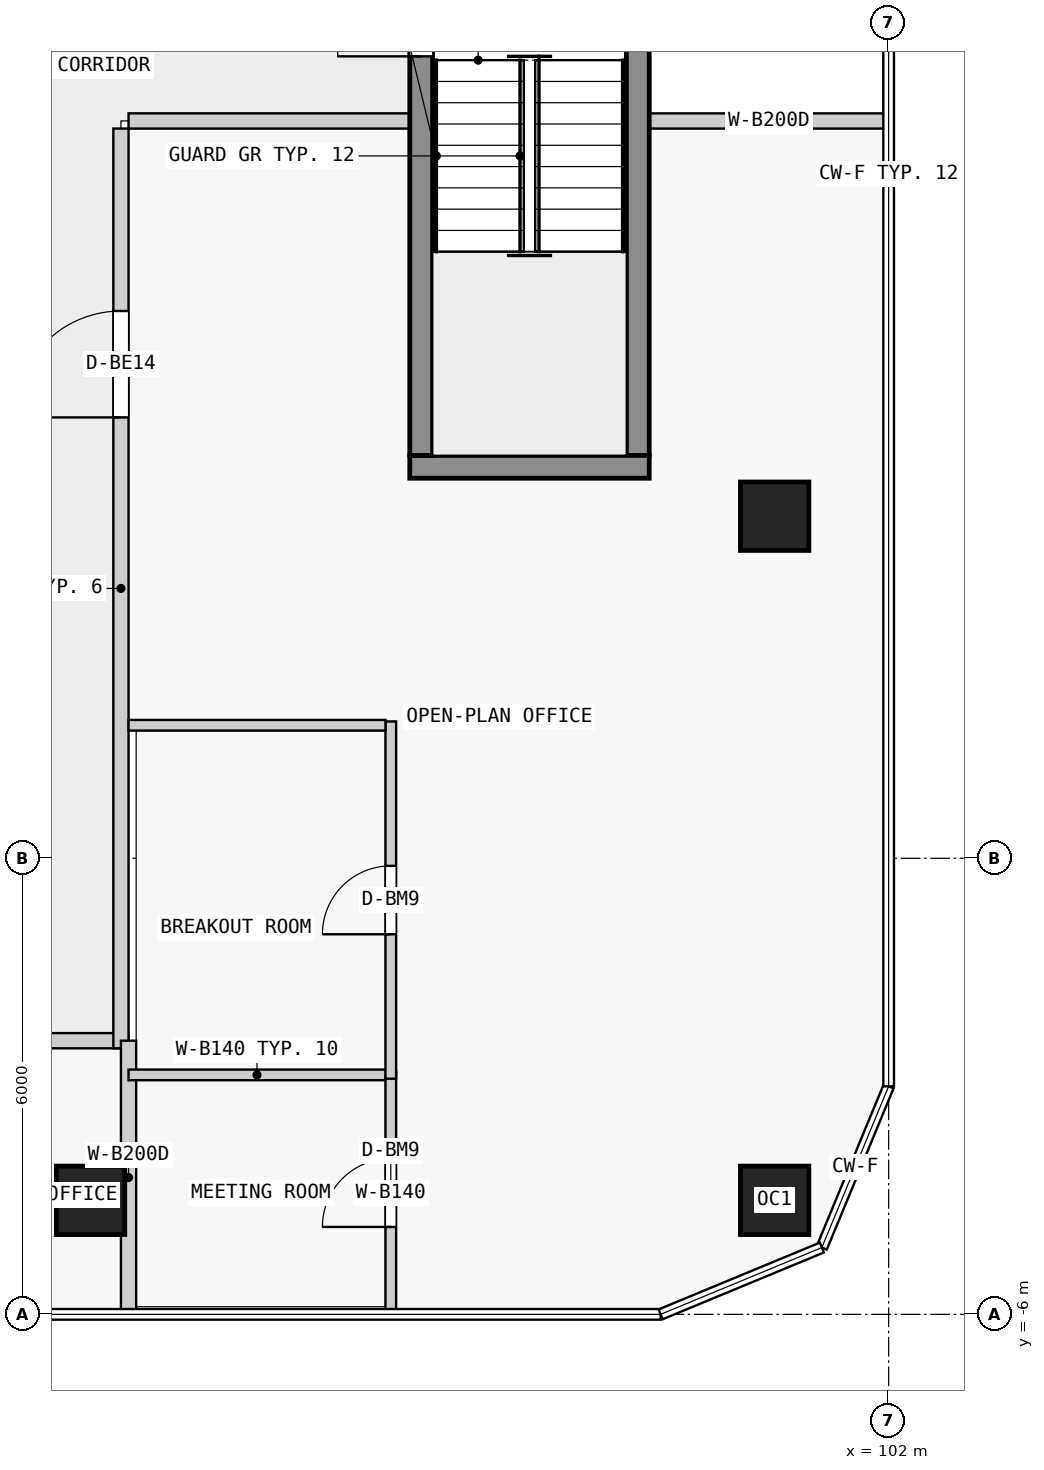
"""IFC4 building model, lengths in metres.
Left out: names, types, materials, properties, quantities, classifications, styles, units other than length and angle.
Written with IfcOpenShell. Run it as: python <this file> out.ifc"""

import sys

from ifc_helpers import new_model, si_unit, direction, frame, frame_2d, origin, origin_2d, place, context, subcontext, project, spatial, rectangle, extrude, element, fill, save


model = new_model("IFC4")
c1 = context("Model", 3, precision=1e-05, world=origin(), true_north=direction((0.0, 1.0)))
c2 = subcontext(c1, "Body", "Model", "MODEL_VIEW")
j1 = project(units=[si_unit("LENGTHUNIT", "METRE"), si_unit("PLANEANGLEUNIT", "RADIAN")], contexts=[c1])
p1 = place(None, origin())
s1 = spatial("IfcSite", under=j1, at=p1, CompositionType="ELEMENT")
p2 = place(p1, origin())
s2 = spatial("IfcBuilding", under=s1, at=p2, CompositionType="ELEMENT")
p3 = place(p2, frame((0.0, 0.0, 113.3)))
s3 = spatial("IfcBuildingStorey", under=s2, at=p3, CompositionType="ELEMENT", Elevation=113.3)
for number, where, z_axis, x_axis in (
    (1, (91.5, -4.5, 0.0), (0.0, 0.0, 1.0), (1.0, 0.0, 0.0)),
    (2, (100.5, -4.5, 0.0), (0.0, 0.0, 1.0), (1.0, 0.0, 0.0)),
    (3, (100.5, 4.5, 0.0), (0.0, 0.0, 1.0), (1.0, 0.0, 0.0)),
):
    element("IfcColumn", number, at=place(p3, frame(where, z_axis=z_axis, x_axis=x_axis)), inside=s3, PredefinedType="COLUMN", context=c2, shape_type="SweptSolid", body=[
        extrude(rectangle(XDim=0.9, YDim=0.9, at=origin_2d()), origin(), (0.0, 0.0, 1.0), 3.5),
    ])
p4 = place(p3, frame((95.85, 5.3, 0.0), z_axis=(0.0, 0.0, 1.0), x_axis=(0.0, 1.0, 0.0)))
e4 = element("IfcWall", 4, at=p4, inside=s3, PredefinedType="SHEAR", context=c2, shape_type="SweptSolid", body=[
    extrude(rectangle(XDim=6.4, YDim=0.3, at=frame_2d((3.2, 0.0))), origin(), (0.0, 0.0, 1.0), 3.25),
])
p5 = place(p4, frame((5.25, 0.0, 0.0)))
e5 = element("IfcOpeningElement", 5, at=p5, cuts=e4, PredefinedType="OPENING", context=c2, shape_type="SweptSolid", body=[
    extrude(rectangle(XDim=1.1, YDim=2.1, at=frame_2d((0.55, 1.05))), frame((0.0, 0.16, 0.0), z_axis=(0.0, -1.0, 0.0), x_axis=(1.0, 0.0, 0.0)), (0.0, 0.0, 1.0), 0.32),
])
p6 = place(p3, frame((98.7, 5.3, 0.0), z_axis=(0.0, 0.0, 1.0), x_axis=(0.0, 1.0, 0.0)))
e6 = element("IfcWall", 6, at=p6, inside=s3, PredefinedType="SHEAR", context=c2, shape_type="SweptSolid", body=[
    extrude(rectangle(XDim=6.4, YDim=0.3, at=frame_2d((3.2, 0.0))), origin(), (0.0, 0.0, 1.0), 3.25),
])
p7 = place(p3, frame((95.7, 5.15, 0.0), z_axis=(0.0, 0.0, 1.0), x_axis=(1.0, 0.0, 0.0)))
e7 = element("IfcWall", 7, at=p7, inside=s3, PredefinedType="SHEAR", context=c2, shape_type="SweptSolid", body=[
    extrude(rectangle(XDim=3.15, YDim=0.3, at=frame_2d((1.575, 0.0))), origin(), (0.0, 0.0, 1.0), 3.25),
])
p8 = place(p3, frame((72.0, -2.4, 0.0), z_axis=(0.0, 0.0, 1.0), x_axis=(1.0, 0.0, 0.0)))
e8 = element("IfcWall", 8, at=p8, inside=s3, PredefinedType="PARTITIONING", context=c2, shape_type="SweptSolid", body=[
    extrude(rectangle(XDim=20.0, YDim=0.2, at=frame_2d((10.0, 0.0))), origin(), (0.0, 0.0, 1.0), 3.25),
])
p9 = place(p8, frame((11.5, 0.0, 0.0)))
e9 = element("IfcOpeningElement", 9, at=p9, cuts=e8, PredefinedType="OPENING", context=c2, shape_type="SweptSolid", body=[
    extrude(rectangle(XDim=1.0, YDim=2.4, at=frame_2d((0.5, 1.2))), frame((0.0, 0.11, 0.0), z_axis=(0.0, -1.0, 0.0), x_axis=(1.0, 0.0, 0.0)), (0.0, 0.0, 1.0), 0.22),
])
p10 = place(p3, frame((91.9, -2.5, 0.0), z_axis=(0.0, 0.0, 1.0), x_axis=(0.0, 1.0, 0.0)))
e10 = element("IfcWall", 10, at=p10, inside=s3, PredefinedType="PARTITIONING", context=c2, shape_type="SweptSolid", body=[
    extrude(rectangle(XDim=12.1, YDim=0.2, at=frame_2d((6.05, 0.0))), origin(), (0.0, 0.0, 1.0), 3.25),
])
p11 = place(p10, frame((8.3, 0.0, 0.0)))
e11 = element("IfcOpeningElement", 11, at=p11, cuts=e10, PredefinedType="OPENING", context=c2, shape_type="SweptSolid", body=[
    extrude(rectangle(XDim=1.4, YDim=2.4, at=frame_2d((0.7, 1.2))), frame((0.0, 0.11, 0.0), z_axis=(0.0, -1.0, 0.0), x_axis=(1.0, 0.0, 0.0)), (0.0, 0.0, 1.0), 0.22),
])
p12 = place(p3, frame((92.0, 9.7, 0.0), z_axis=(0.0, 0.0, 1.0), x_axis=(1.0, 0.0, 0.0)))
e12 = element("IfcWall", 12, at=p12, inside=s3, PredefinedType="PARTITIONING", context=c2, shape_type="SweptSolid", body=[
    extrude(rectangle(XDim=3.7, YDim=0.2, at=frame_2d((1.85, 0.0))), origin(), (0.0, 0.0, 1.0), 3.2),
])
p13 = place(p3, frame((98.85, 9.7, 0.0), z_axis=(0.0, 0.0, 1.0), x_axis=(1.0, 0.0, 0.0)))
e13 = element("IfcWall", 13, at=p13, inside=s3, PredefinedType="PARTITIONING", context=c2, shape_type="SweptSolid", body=[
    extrude(rectangle(XDim=3.15, YDim=0.2, at=frame_2d((1.575, 0.0))), origin(), (0.0, 0.0, 1.0), 3.2),
])
p14 = place(p3, frame((92.0, -6.0, 0.0), z_axis=(0.0, 0.0, 1.0), x_axis=(0.0, 1.0, 0.0)))
e14 = element("IfcWall", 14, at=p14, inside=s3, PredefinedType="PARTITIONING", context=c2, shape_type="SweptSolid", body=[
    extrude(rectangle(XDim=3.6, YDim=0.2, at=frame_2d((1.8, 0.0))), origin(), (0.0, 0.0, 1.0), 3.25),
])
p15 = place(p3, frame((95.45, -6.0, 0.0), z_axis=(0.0, 0.0, 1.0), x_axis=(0.0, 1.0, 0.0)))
e15 = element("IfcWall", 15, at=p15, inside=s3, PredefinedType="PARTITIONING", context=c2, shape_type="SweptSolid", body=[
    extrude(rectangle(XDim=3.2, YDim=0.14, at=frame_2d((1.6, 0.0))), origin(), (0.0, 0.0, 1.0), 3.2),
])
p16 = place(p15, frame((1.15, 0.0, 0.0)))
e16 = element("IfcOpeningElement", 16, at=p16, cuts=e15, PredefinedType="OPENING", context=c2, shape_type="SweptSolid", body=[
    extrude(rectangle(XDim=0.9, YDim=2.4, at=frame_2d((0.45, 1.2))), frame((0.0, 0.08, 0.0), z_axis=(0.0, -1.0, 0.0), x_axis=(1.0, 0.0, 0.0)), (0.0, 0.0, 1.0), 0.16),
])
p17 = place(p3, frame((92.0, -2.85, 0.0), z_axis=(0.0, 0.0, 1.0), x_axis=(1.0, 0.0, 0.0)))
e17 = element("IfcWall", 17, at=p17, inside=s3, PredefinedType="PARTITIONING", context=c2, shape_type="SweptSolid", body=[
    extrude(rectangle(XDim=3.38, YDim=0.14, at=frame_2d((1.69, 0.0))), origin(), (0.0, 0.0, 1.0), 3.2),
])
p18 = place(p3, frame((95.45, -2.9, 0.0), z_axis=(0.0, 0.0, 1.0), x_axis=(0.0, 1.0, 0.0)))
e18 = element("IfcWall", 18, at=p18, inside=s3, PredefinedType="PARTITIONING", context=c2, shape_type="SweptSolid", body=[
    extrude(rectangle(XDim=4.7, YDim=0.14, at=frame_2d((2.35, 0.0))), origin(), (0.0, 0.0, 1.0), 3.2),
])
p19 = place(p18, frame((1.9, 0.0, 0.0)))
e19 = element("IfcOpeningElement", 19, at=p19, cuts=e18, PredefinedType="OPENING", context=c2, shape_type="SweptSolid", body=[
    extrude(rectangle(XDim=0.9, YDim=2.4, at=frame_2d((0.45, 1.2))), frame((0.0, 0.08, 0.0), z_axis=(0.0, -1.0, 0.0), x_axis=(1.0, 0.0, 0.0)), (0.0, 0.0, 1.0), 0.16),
])
p20 = place(p3, frame((92.0, 1.75, 0.0), z_axis=(0.0, 0.0, 1.0), x_axis=(1.0, 0.0, 0.0)))
e20 = element("IfcWall", 20, at=p20, inside=s3, PredefinedType="PARTITIONING", context=c2, shape_type="SweptSolid", body=[
    extrude(rectangle(XDim=3.38, YDim=0.14, at=frame_2d((1.69, 0.0))), origin(), (0.0, 0.0, 1.0), 3.2),
])
p21 = place(p5, origin())
e21 = element("IfcDoor", 21, at=p21, inside=s3, OperationType="SINGLE_SWING_LEFT", PredefinedType="DOOR", context=c2, shape_type="SweptSolid", body=[
    extrude(rectangle(XDim=1.1, YDim=2.1, at=frame_2d((0.55, 1.05))), frame((0.0, 0.025, 0.0), z_axis=(0.0, -1.0, 0.0), x_axis=(1.0, 0.0, 0.0)), (0.0, 0.0, 1.0), 0.05),
])
fill(e5, e21)
p22 = place(p11, origin())
e22 = element("IfcDoor", 22, at=p22, inside=s3, OperationType="DOUBLE_DOOR_SINGLE_SWING", PredefinedType="DOOR", context=c2, shape_type="SweptSolid", body=[
    extrude(rectangle(XDim=1.4, YDim=2.4, at=frame_2d((0.7, 1.2))), frame((0.0, 0.025, 0.0), z_axis=(0.0, -1.0, 0.0), x_axis=(1.0, 0.0, 0.0)), (0.0, 0.0, 1.0), 0.05),
])
fill(e11, e22)
p23 = place(p16, origin())
e23 = element("IfcDoor", 23, at=p23, inside=s3, OperationType="SINGLE_SWING_LEFT", PredefinedType="DOOR", context=c2, shape_type="SweptSolid", body=[
    extrude(rectangle(XDim=0.9, YDim=2.4, at=frame_2d((0.45, 1.2))), frame((0.0, 0.025, 0.0), z_axis=(0.0, -1.0, 0.0), x_axis=(1.0, 0.0, 0.0)), (0.0, 0.0, 1.0), 0.05),
])
fill(e16, e23)
p24 = place(p19, origin())
e24 = element("IfcDoor", 24, at=p24, inside=s3, OperationType="SINGLE_SWING_LEFT", PredefinedType="DOOR", context=c2, shape_type="SweptSolid", body=[
    extrude(rectangle(XDim=0.9, YDim=2.4, at=frame_2d((0.45, 1.2))), frame((0.0, 0.025, 0.0), z_axis=(0.0, -1.0, 0.0), x_axis=(1.0, 0.0, 0.0)), (0.0, 0.0, 1.0), 0.05),
])
fill(e19, e24)
save(model, sys.argv[1])
